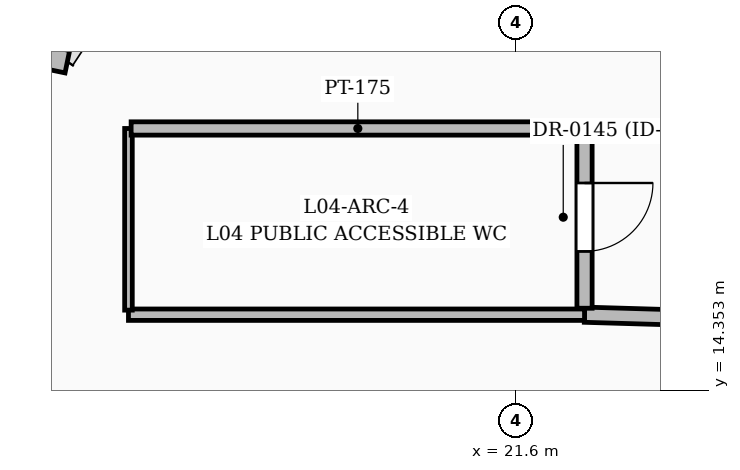
"""IFC4 building model, lengths in metres.
Left out: names, types, materials, properties, quantities, classifications, styles, units other than length and angle.
Written with IfcOpenShell. Run it as: python <this file> out.ifc"""

import sys

from ifc_helpers import new_model, si_unit, direction, frame, frame_2d, origin, place, context, subcontext, project, spatial, rectangle, extrude, element, fill, save


model = new_model("IFC4")
c1 = context("Model", 3, precision=1e-05, world=origin(), true_north=direction((0.0, 1.0)))
c2 = subcontext(c1, "Body", "Model", "MODEL_VIEW")
j1 = project(units=[si_unit("LENGTHUNIT", "METRE"), si_unit("PLANEANGLEUNIT", "RADIAN")], contexts=[c1])
p1 = place(None, origin())
s1 = spatial("IfcSite", under=j1, at=p1, CompositionType="ELEMENT")
p2 = place(p1, origin())
s2 = spatial("IfcBuilding", under=s1, at=p2, CompositionType="ELEMENT")
p3 = place(p2, frame((0.0, 0.0, 21.9)))
s3 = spatial("IfcBuildingStorey", under=s2, at=p3, CompositionType="ELEMENT", Elevation=21.9)
p4 = place(p3, frame((13.43, 19.147, 0.0), z_axis=(0.0, 0.0, 1.0), x_axis=(0.979248147508, -0.202664909649, 0.0)))
e1 = element("IfcWall", 1, at=p4, inside=s3, PredefinedType="SOLIDWALL", context=c2, shape_type="SweptSolid", body=[
    extrude(rectangle(XDim=2.314, YDim=0.3, at=frame_2d((1.157, 0.0))), origin(), (0.0, 0.0, 1.0), 2.975),
])
p5 = place(p4, frame((0.55, 0.0, 0.8)))
e2 = element("IfcOpeningElement", 2, at=p5, cuts=e1, PredefinedType="OPENING", context=c2, shape_type="SweptSolid", body=[
    extrude(rectangle(XDim=1.2, YDim=1.8, at=frame_2d((0.6, 0.9))), frame((0.0, 0.16, 0.0), z_axis=(0.0, -1.0, 0.0), x_axis=(1.0, 0.0, 0.0)), (0.0, 0.0, 1.0), 0.32),
])
p6 = place(p3, frame((22.5, 15.35, 0.0), z_axis=(0.0, 0.0, 1.0), x_axis=(0.999566926946, -0.029427173771, 0.0)))
e3 = element("IfcWall", 3, at=p6, inside=s3, PredefinedType="PARTITIONING", context=c2, shape_type="SweptSolid", body=[
    extrude(rectangle(XDim=5.102, YDim=0.2, at=frame_2d((2.551, 0.0))), origin(), (0.0, 0.0, 1.0), 1.97),
])
p7 = place(p3, frame((38.665, 17.8, 0.0), z_axis=(0.0, 0.0, 1.0), x_axis=(-1.0, 0.0, 0.0)))
e4 = element("IfcWall", 4, at=p7, inside=s3, PredefinedType="PARTITIONING", context=c2, shape_type="SweptSolid", body=[
    extrude(rectangle(XDim=16.165, YDim=0.2, at=frame_2d((8.083, 0.0))), origin(), (0.0, 0.0, 1.0), 1.97),
])
p8 = place(p3, frame((22.5, 17.715, 0.0), z_axis=(0.0, 0.0, 1.0), x_axis=(0.0, -1.0, 0.0)))
e5 = element("IfcWall", 5, at=p8, inside=s3, PredefinedType="PARTITIONING", context=c2, shape_type="SweptSolid", body=[
    extrude(rectangle(XDim=2.28, YDim=0.2, at=frame_2d((1.14, 0.0))), origin(), (0.0, 0.0, 1.0), 4.2),
])
p9 = place(p8, frame((0.632, 0.0, 0.0)))
e6 = element("IfcOpeningElement", 6, at=p9, cuts=e5, PredefinedType="OPENING", context=c2, shape_type="SweptSolid", body=[
    extrude(rectangle(XDim=0.9, YDim=2.1, at=frame_2d((0.45, 1.05))), frame((0.0, 0.11, 0.0), z_axis=(0.0, -1.0, 0.0), x_axis=(1.0, 0.0, 0.0)), (0.0, 0.0, 1.0), 0.22),
])
p10 = place(p3, frame((22.5, 15.35, 0.0), z_axis=(0.0, 0.0, 1.0), x_axis=(-1.0, 0.0, 0.0)))
e7 = element("IfcWall", 7, at=p10, inside=s3, PredefinedType="PARTITIONING", context=c2, shape_type="SweptSolid", body=[
    extrude(rectangle(XDim=6.0, YDim=0.15, at=frame_2d((3.0, 0.0))), origin(), (0.0, 0.0, 1.0), 3.761),
])
p11 = place(p3, frame((16.5, 15.41, 0.0), z_axis=(0.0, 0.0, 1.0), x_axis=(0.0, 1.0, 0.0)))
e8 = element("IfcWall", 8, at=p11, inside=s3, PredefinedType="PARTITIONING", context=c2, shape_type="SweptSolid", body=[
    extrude(rectangle(XDim=2.39, YDim=0.1, at=frame_2d((1.195, 0.0))), origin(), (0.0, 0.0, 1.0), 4.2),
])
p12 = place(p3, frame((16.535, 17.8, 0.0), z_axis=(0.0, 0.0, 1.0), x_axis=(1.0, 0.0, 0.0)))
e9 = element("IfcWall", 9, at=p12, inside=s3, PredefinedType="PARTITIONING", context=c2, shape_type="SweptSolid", body=[
    extrude(rectangle(XDim=5.965, YDim=0.175, at=frame_2d((2.982, 0.0))), origin(), (0.0, 0.0, 1.0), 3.761),
])
p13 = place(p9, origin())
e10 = element("IfcDoor", 10, at=p13, inside=s3, OperationType="SINGLE_SWING_LEFT", PredefinedType="DOOR", context=c2, shape_type="SweptSolid", body=[
    extrude(rectangle(XDim=0.9, YDim=2.1, at=frame_2d((0.45, 1.05))), frame((0.0, 0.025, 0.0), z_axis=(0.0, -1.0, 0.0), x_axis=(1.0, 0.0, 0.0)), (0.0, 0.0, 1.0), 0.05),
])
fill(e6, e10)
save(model, sys.argv[1])
